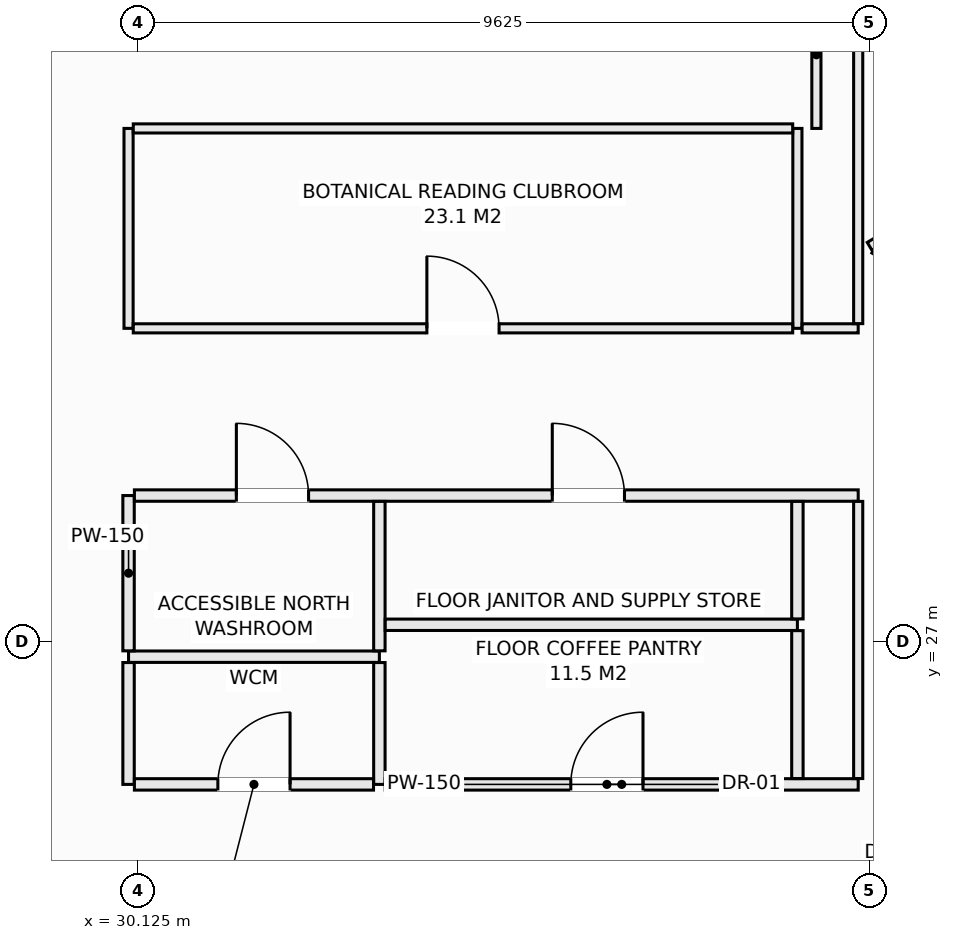
"""IFC4 building model, lengths in metres.
Left out: names, types, materials, properties, quantities, classifications, styles, units other than length and angle.
Written with IfcOpenShell. Run it as: python <this file> out.ifc"""

import sys

from ifc_helpers import new_model, si_unit, direction, frame, frame_2d, origin, place, context, subcontext, project, spatial, rectangle, extrude, element, fill, save


model = new_model("IFC4")
c1 = context("Model", 3, precision=1e-05, world=origin(), true_north=direction((0.0, 1.0)))
c2 = subcontext(c1, "Body", "Model", "MODEL_VIEW")
j1 = project(units=[si_unit("LENGTHUNIT", "METRE"), si_unit("PLANEANGLEUNIT", "RADIAN")], contexts=[c1])
p1 = place(None, origin())
s1 = spatial("IfcSite", under=j1, at=p1, CompositionType="ELEMENT")
p2 = place(p1, origin())
s2 = spatial("IfcBuilding", under=s1, at=p2, CompositionType="ELEMENT")
p3 = place(p2, frame((0.0, 0.0, 272.3)))
s3 = spatial("IfcBuildingStorey", under=s2, at=p3, CompositionType="ELEMENT", Elevation=272.3)
p4 = place(p3, frame((30.0, 26.8, 0.0), z_axis=(0.0, 0.0, 1.0), x_axis=(1.0, 0.0, 0.0)))
e1 = element("IfcWall", 1, at=p4, inside=s3, PredefinedType="PARTITIONING", context=c2, shape_type="SweptSolid", body=[
    extrude(rectangle(XDim=3.3, YDim=0.15, at=frame_2d((1.65, 0.0))), origin(), (0.0, 0.0, 1.0), 2.98),
])
p5 = place(p3, frame((30.0, 25.12, 0.0), z_axis=(0.0, 0.0, 1.0), x_axis=(0.0, 1.0, 0.0)))
e2 = element("IfcWall", 2, at=p5, inside=s3, PredefinedType="PARTITIONING", context=c2, shape_type="SweptSolid", body=[
    extrude(rectangle(XDim=1.603, YDim=0.15, at=frame_2d((0.801, 0.0))), origin(), (0.0, 0.0, 1.0), 2.98),
])
p6 = place(p3, frame((30.0, 26.877, 0.0), z_axis=(0.0, 0.0, 1.0), x_axis=(0.0, 1.0, 0.0)))
e3 = element("IfcWall", 3, at=p6, inside=s3, PredefinedType="PARTITIONING", context=c2, shape_type="SweptSolid", body=[
    extrude(rectangle(XDim=2.043, YDim=0.15, at=frame_2d((1.021, 0.0))), origin(), (0.0, 0.0, 1.0), 2.98),
])
p7 = place(p3, frame((30.0, 31.12, 0.0), z_axis=(0.0, 0.0, 1.0), x_axis=(0.0, 1.0, 0.0)))
e4 = element("IfcWall", 4, at=p7, inside=s3, PredefinedType="PARTITIONING", context=c2, shape_type="SweptSolid", body=[
    extrude(rectangle(XDim=2.63, YDim=0.12, at=frame_2d((1.315, 0.0))), origin(), (0.0, 0.0, 1.0), 2.98),
])
p8 = place(p3, frame((30.077, 28.92, 0.0), z_axis=(0.0, 0.0, 1.0), x_axis=(1.0, 0.0, 0.0)))
e5 = element("IfcWall", 5, at=p8, inside=s3, PredefinedType="PARTITIONING", context=c2, shape_type="SweptSolid", body=[
    extrude(rectangle(XDim=9.523, YDim=0.15, at=frame_2d((4.762, 0.0))), origin(), (0.0, 0.0, 1.0), 2.98),
])
p9 = place(p8, frame((1.342, 0.0, 0.0)))
e6 = element("IfcOpeningElement", 6, at=p9, cuts=e5, PredefinedType="OPENING", context=c2, shape_type="SweptSolid", body=[
    extrude(rectangle(XDim=0.95, YDim=2.1, at=frame_2d((0.475, 1.05))), frame((0.0, 0.085, 0.0), z_axis=(0.0, -1.0, 0.0), x_axis=(1.0, 0.0, 0.0)), (0.0, 0.0, 1.0), 0.17),
])
p10 = place(p8, frame((5.498, 0.0, 0.0)))
e7 = element("IfcOpeningElement", 7, at=p10, cuts=e5, PredefinedType="OPENING", context=c2, shape_type="SweptSolid", body=[
    extrude(rectangle(XDim=0.95, YDim=2.1, at=frame_2d((0.475, 1.05))), frame((0.0, 0.085, 0.0), z_axis=(0.0, -1.0, 0.0), x_axis=(1.0, 0.0, 0.0)), (0.0, 0.0, 1.0), 0.17),
])
p11 = place(p3, frame((33.3, 25.12, 0.0), z_axis=(0.0, 0.0, 1.0), x_axis=(0.0, 1.0, 0.0)))
e8 = element("IfcWall", 8, at=p11, inside=s3, PredefinedType="PARTITIONING", context=c2, shape_type="SweptSolid", body=[
    extrude(rectangle(XDim=1.603, YDim=0.15, at=frame_2d((0.801, 0.0))), origin(), (0.0, 0.0, 1.0), 2.98),
])
p12 = place(p3, frame((33.3, 26.877, 0.0), z_axis=(0.0, 0.0, 1.0), x_axis=(0.0, 1.0, 0.0)))
e9 = element("IfcWall", 9, at=p12, inside=s3, PredefinedType="PARTITIONING", context=c2, shape_type="SweptSolid", body=[
    extrude(rectangle(XDim=1.966, YDim=0.15, at=frame_2d((0.983, 0.0))), origin(), (0.0, 0.0, 1.0), 2.98),
])
p13 = place(p3, frame((30.077, 25.12, 0.0), z_axis=(0.0, 0.0, 1.0), x_axis=(1.0, 0.0, 0.0)))
e10 = element("IfcWall", 10, at=p13, inside=s3, PredefinedType="PARTITIONING", context=c2, shape_type="SweptSolid", body=[
    extrude(rectangle(XDim=3.146, YDim=0.15, at=frame_2d((1.573, 0.0))), origin(), (0.0, 0.0, 1.0), 2.98),
])
p14 = place(p13, frame((1.098, 0.0, 0.0)))
e11 = element("IfcOpeningElement", 11, at=p14, cuts=e10, PredefinedType="OPENING", context=c2, shape_type="SweptSolid", body=[
    extrude(rectangle(XDim=0.95, YDim=2.1, at=frame_2d((0.475, 1.05))), frame((0.0, 0.085, 0.0), z_axis=(0.0, -1.0, 0.0), x_axis=(1.0, 0.0, 0.0)), (0.0, 0.0, 1.0), 0.17),
])
p15 = place(p3, frame((33.377, 25.12, 0.0), z_axis=(0.0, 0.0, 1.0), x_axis=(1.0, 0.0, 0.0)))
e12 = element("IfcWall", 12, at=p15, inside=s3, PredefinedType="PARTITIONING", context=c2, shape_type="SweptSolid", body=[
    extrude(rectangle(XDim=6.223, YDim=0.15, at=frame_2d((3.112, 0.0))), origin(), (0.0, 0.0, 1.0), 2.98),
])
p16 = place(p15, frame((2.441, 0.0, 0.0)))
e13 = element("IfcOpeningElement", 13, at=p16, cuts=e12, PredefinedType="OPENING", context=c2, shape_type="SweptSolid", body=[
    extrude(rectangle(XDim=0.95, YDim=2.1, at=frame_2d((0.475, 1.05))), frame((0.0, 0.085, 0.0), z_axis=(0.0, -1.0, 0.0), x_axis=(1.0, 0.0, 0.0)), (0.0, 0.0, 1.0), 0.17),
])
p17 = place(p3, frame((33.377, 27.22, 0.0), z_axis=(0.0, 0.0, 1.0), x_axis=(1.0, 0.0, 0.0)))
e14 = element("IfcWall", 14, at=p17, inside=s3, PredefinedType="PARTITIONING", context=c2, shape_type="SweptSolid", body=[
    extrude(rectangle(XDim=5.423, YDim=0.15, at=frame_2d((2.711, 0.0))), origin(), (0.0, 0.0, 1.0), 2.98),
])
p18 = place(p3, frame((38.8, 25.197, 0.0), z_axis=(0.0, 0.0, 1.0), x_axis=(0.0, 1.0, 0.0)))
e15 = element("IfcWall", 15, at=p18, inside=s3, PredefinedType="PARTITIONING", context=c2, shape_type="SweptSolid", body=[
    extrude(rectangle(XDim=1.946, YDim=0.15, at=frame_2d((0.973, 0.0))), origin(), (0.0, 0.0, 1.0), 2.98),
])
p19 = place(p3, frame((38.8, 27.297, 0.0), z_axis=(0.0, 0.0, 1.0), x_axis=(0.0, 1.0, 0.0)))
e16 = element("IfcWall", 16, at=p19, inside=s3, PredefinedType="PARTITIONING", context=c2, shape_type="SweptSolid", body=[
    extrude(rectangle(XDim=1.546, YDim=0.15, at=frame_2d((0.773, 0.0))), origin(), (0.0, 0.0, 1.0), 2.98),
])
p20 = place(p3, frame((38.8, 31.12, 0.0), z_axis=(0.0, 0.0, 1.0), x_axis=(0.0, 1.0, 0.0)))
e17 = element("IfcWall", 17, at=p20, inside=s3, PredefinedType="PARTITIONING", context=c2, shape_type="SweptSolid", body=[
    extrude(rectangle(XDim=2.63, YDim=0.12, at=frame_2d((1.315, 0.0))), origin(), (0.0, 0.0, 1.0), 2.98),
])
p21 = place(p3, frame((30.062, 31.12, 0.0), z_axis=(0.0, 0.0, 1.0), x_axis=(1.0, 0.0, 0.0)))
e18 = element("IfcWall", 18, at=p21, inside=s3, PredefinedType="PARTITIONING", context=c2, shape_type="SweptSolid", body=[
    extrude(rectangle(XDim=8.676, YDim=0.12, at=frame_2d((4.338, 0.0))), origin(), (0.0, 0.0, 1.0), 2.98),
])
p22 = place(p21, frame((3.863, 0.0, 0.0)))
e19 = element("IfcOpeningElement", 19, at=p22, cuts=e18, PredefinedType="OPENING", context=c2, shape_type="SweptSolid", body=[
    extrude(rectangle(XDim=0.95, YDim=2.1, at=frame_2d((0.475, 1.05))), frame((0.0, 0.07, 0.0), z_axis=(0.0, -1.0, 0.0), x_axis=(1.0, 0.0, 0.0)), (0.0, 0.0, 1.0), 0.14),
])
p23 = place(p3, frame((38.862, 31.12, 0.0), z_axis=(0.0, 0.0, 1.0), x_axis=(1.0, 0.0, 0.0)))
e20 = element("IfcWall", 20, at=p23, inside=s3, PredefinedType="PARTITIONING", context=c2, shape_type="SweptSolid", body=[
    extrude(rectangle(XDim=0.738, YDim=0.12, at=frame_2d((0.369, 0.0))), origin(), (0.0, 0.0, 1.0), 2.98),
])
p24 = place(p3, frame((30.062, 33.75, 0.0), z_axis=(0.0, 0.0, 1.0), x_axis=(1.0, 0.0, 0.0)))
e21 = element("IfcWall", 21, at=p24, inside=s3, PredefinedType="PARTITIONING", context=c2, shape_type="SweptSolid", body=[
    extrude(rectangle(XDim=8.676, YDim=0.12, at=frame_2d((4.338, 0.0))), origin(), (0.0, 0.0, 1.0), 2.98),
])
p25 = place(p3, frame((39.05, 33.75, 0.0), z_axis=(0.0, 0.0, 1.0), x_axis=(0.0, 1.0, 0.0)))
e22 = element("IfcWall", 22, at=p25, inside=s3, PredefinedType="PARTITIONING", context=c2, shape_type="SweptSolid", body=[
    extrude(rectangle(XDim=1.938, YDim=0.12, at=frame_2d((0.969, 0.0))), origin(), (0.0, 0.0, 1.0), 2.98),
])
p26 = place(p3, frame((39.6, 25.197, 0.0), z_axis=(0.0, 0.0, 1.0), x_axis=(0.0, 1.0, 0.0)))
e23 = element("IfcWall", 23, at=p26, inside=s3, PredefinedType="PARTITIONING", context=c2, shape_type="SweptSolid", body=[
    extrude(rectangle(XDim=3.646, YDim=0.12, at=frame_2d((1.823, 0.0))), origin(), (0.0, 0.0, 1.0), 2.98),
])
p27 = place(p3, frame((39.6, 31.182, 0.0), z_axis=(0.0, 0.0, 1.0), x_axis=(0.0, 1.0, 0.0)))
e24 = element("IfcWall", 24, at=p27, inside=s3, PredefinedType="PARTITIONING", context=c2, shape_type="SweptSolid", body=[
    extrude(rectangle(XDim=5.245, YDim=0.12, at=frame_2d((2.623, 0.0))), origin(), (0.0, 0.0, 1.0), 2.98),
])
p28 = place(p3, frame((39.662, 36.348, 0.0), z_axis=(0.0, 0.0, 1.0), x_axis=(0.616212345115, -0.78758005671, 0.0)))
e25 = element("IfcWall", 25, at=p28, inside=s3, PredefinedType="PARTITIONING", context=c2, shape_type="SweptSolid", body=[
    extrude(rectangle(XDim=2.333, YDim=0.12, at=frame_2d((1.167, 0.0))), origin(), (0.0, 0.0, 1.0), 2.98),
])
p29 = place(p3, frame((39.75, 32.199, 0.0), z_axis=(0.0, 0.0, 1.0), x_axis=(0.857702120906, 0.514146935996, 0.0)))
e26 = element("IfcWall", 26, at=p29, inside=s3, PredefinedType="PARTITIONING", context=c2, shape_type="SweptSolid", body=[
    extrude(rectangle(XDim=1.441, YDim=0.12, at=frame_2d((0.721, 0.0))), origin(), (0.0, 0.0, 1.0), 2.98),
])
p30 = place(p3, frame((39.81, 32.163, 0.0), z_axis=(0.0, 0.0, 1.0), x_axis=(0.858011245414, -0.513630901273, 0.0)))
e27 = element("IfcWall", 27, at=p30, inside=s3, PredefinedType="PARTITIONING", context=c2, shape_type="SweptSolid", body=[
    extrude(rectangle(XDim=1.37, YDim=0.12, at=frame_2d((0.685, 0.0))), origin(), (0.0, 0.0, 1.0), 2.98),
])
p31 = place(p9, origin())
e28 = element("IfcDoor", 28, at=p31, inside=s3, OperationType="SINGLE_SWING_LEFT", PredefinedType="DOOR", context=c2, shape_type="SweptSolid", body=[
    extrude(rectangle(XDim=0.95, YDim=2.1, at=frame_2d((0.475, 1.05))), frame((0.0, 0.025, 0.0), z_axis=(0.0, -1.0, 0.0), x_axis=(1.0, 0.0, 0.0)), (0.0, 0.0, 1.0), 0.05),
])
fill(e6, e28)
p32 = place(p14, origin())
e29 = element("IfcDoor", 29, at=p32, inside=s3, OperationType="SINGLE_SWING_RIGHT", PredefinedType="DOOR", context=c2, shape_type="SweptSolid", body=[
    extrude(rectangle(XDim=0.95, YDim=2.1, at=frame_2d((0.475, 1.05))), frame((0.0, 0.025, 0.0), z_axis=(0.0, -1.0, 0.0), x_axis=(1.0, 0.0, 0.0)), (0.0, 0.0, 1.0), 0.05),
])
fill(e11, e29)
p33 = place(p10, origin())
e30 = element("IfcDoor", 30, at=p33, inside=s3, OperationType="SINGLE_SWING_LEFT", PredefinedType="DOOR", context=c2, shape_type="SweptSolid", body=[
    extrude(rectangle(XDim=0.95, YDim=2.1, at=frame_2d((0.475, 1.05))), frame((0.0, 0.025, 0.0), z_axis=(0.0, -1.0, 0.0), x_axis=(1.0, 0.0, 0.0)), (0.0, 0.0, 1.0), 0.05),
])
fill(e7, e30)
p34 = place(p16, origin())
e31 = element("IfcDoor", 31, at=p34, inside=s3, OperationType="SINGLE_SWING_RIGHT", PredefinedType="DOOR", context=c2, shape_type="SweptSolid", body=[
    extrude(rectangle(XDim=0.95, YDim=2.1, at=frame_2d((0.475, 1.05))), frame((0.0, 0.025, 0.0), z_axis=(0.0, -1.0, 0.0), x_axis=(1.0, 0.0, 0.0)), (0.0, 0.0, 1.0), 0.05),
])
fill(e13, e31)
p35 = place(p22, origin())
e32 = element("IfcDoor", 32, at=p35, inside=s3, OperationType="SINGLE_SWING_LEFT", PredefinedType="DOOR", context=c2, shape_type="SweptSolid", body=[
    extrude(rectangle(XDim=0.95, YDim=2.1, at=frame_2d((0.475, 1.05))), frame((0.0, 0.025, 0.0), z_axis=(0.0, -1.0, 0.0), x_axis=(1.0, 0.0, 0.0)), (0.0, 0.0, 1.0), 0.05),
])
fill(e19, e32)
save(model, sys.argv[1])
